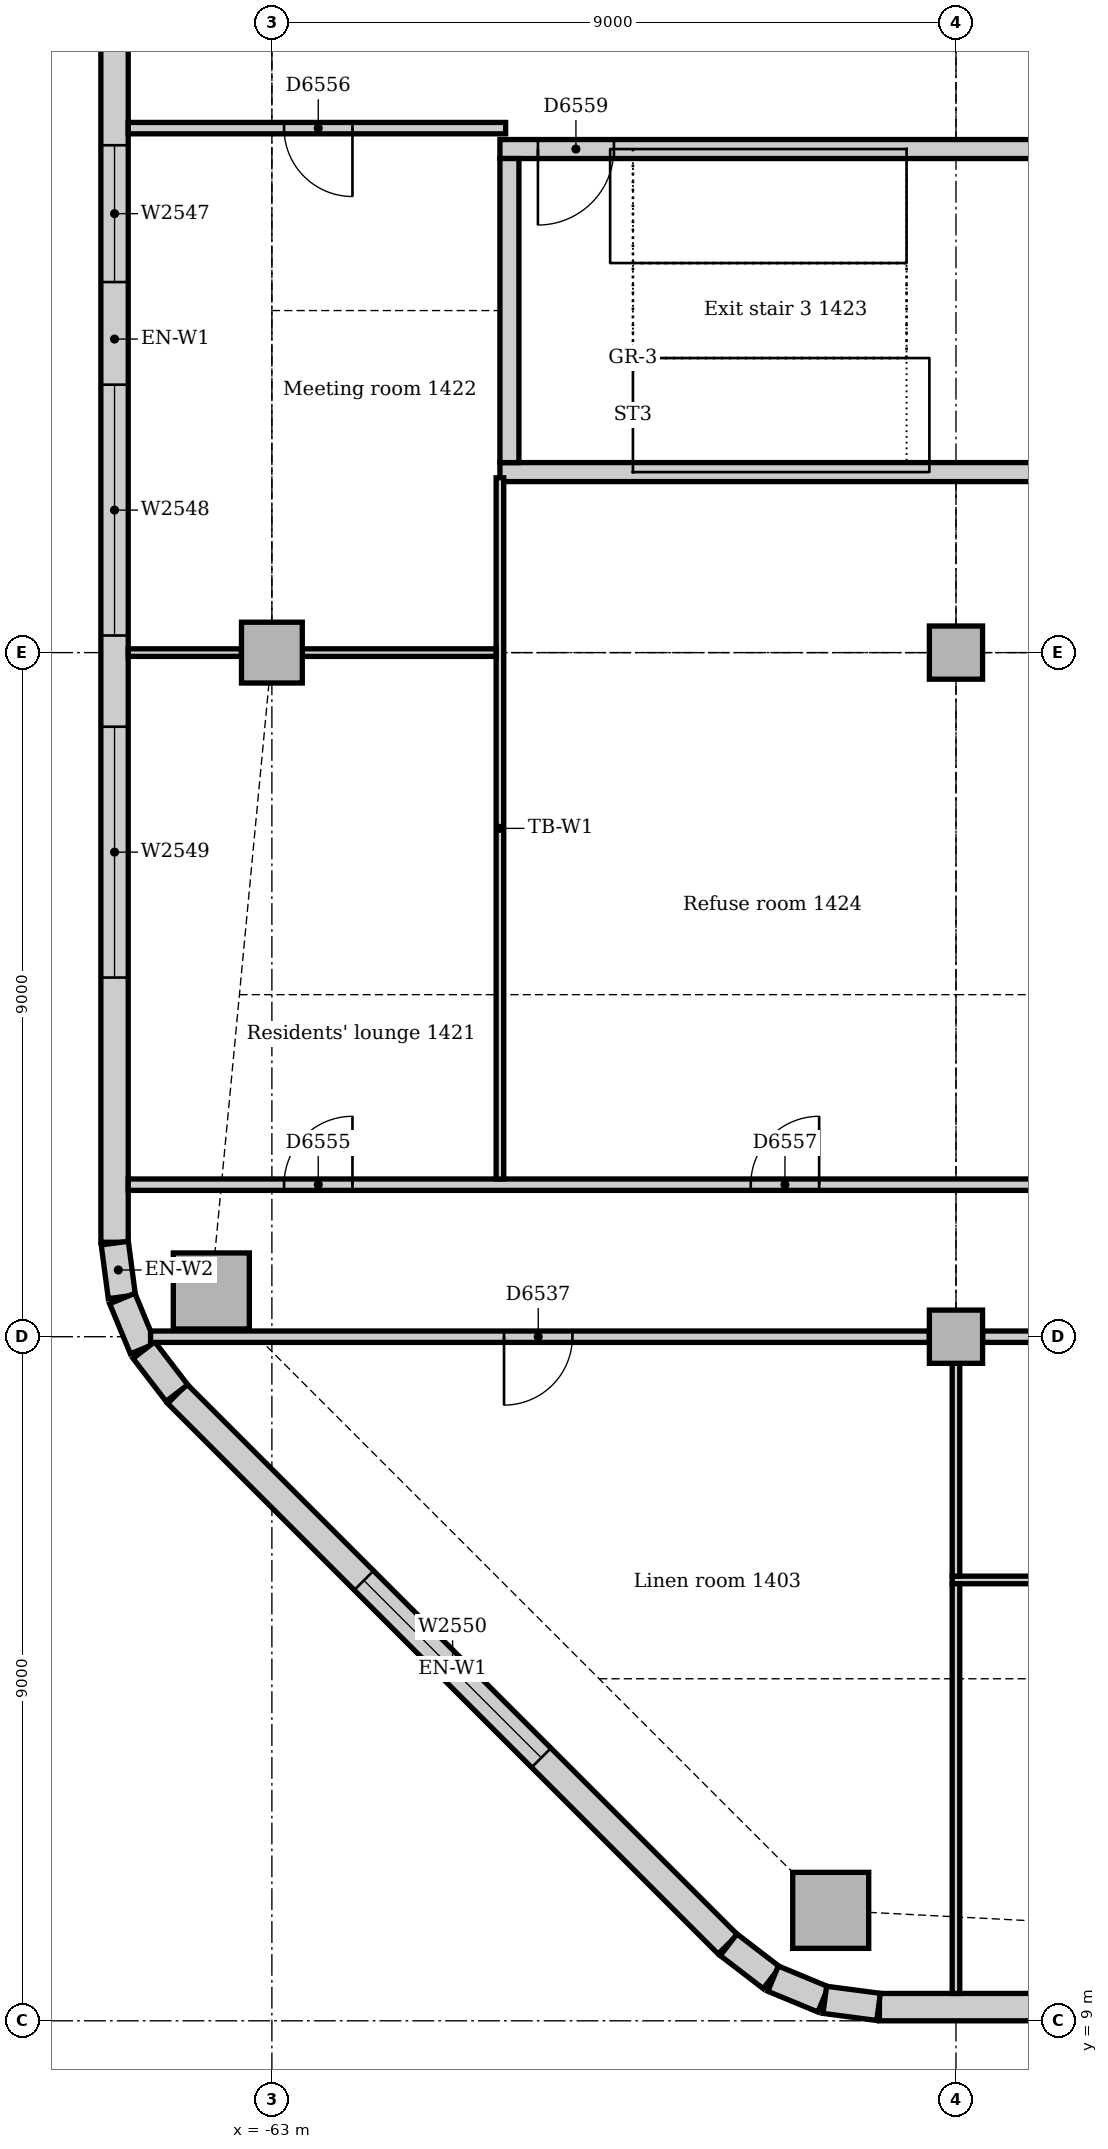
"""IFC4 building model, lengths in metres.
Left out: names, types, materials, properties, quantities, classifications, styles, units other than length and angle.
Written with IfcOpenShell. Run it as: python <this file> out.ifc"""

import sys

from ifc_helpers import new_model, si_unit, direction, frame, frame_2d, origin, origin_2d, place, context, subcontext, project, spatial, rectangle, extrude, element, fill, save


model = new_model("IFC4")
c1 = context("Model", 3, precision=1e-05, world=origin(), true_north=direction((0.0, 1.0)))
c2 = subcontext(c1, "Body", "Model", "MODEL_VIEW")
j1 = project(units=[si_unit("LENGTHUNIT", "METRE"), si_unit("PLANEANGLEUNIT", "RADIAN")], contexts=[c1])
p1 = place(None, origin())
s1 = spatial("IfcSite", under=j1, at=p1, CompositionType="ELEMENT")
p2 = place(p1, origin())
s2 = spatial("IfcBuilding", under=s1, at=p2, CompositionType="ELEMENT")
p3 = place(p2, frame((0.0, 0.0, 63.0)))
s3 = spatial("IfcBuildingStorey", under=s2, at=p3, CompositionType="ELEMENT", Elevation=63.0)
p4 = place(p3, frame((-60.0, 29.375, 0.0), z_axis=(0.0, 0.0, 1.0), x_axis=(1.0, 0.0, 0.0)))
e1 = element("IfcWall", 1, at=p4, inside=s3, PredefinedType="SOLIDWALL", context=c2, shape_type="SweptSolid", body=[
    extrude(rectangle(XDim=7.5, YDim=0.25, at=frame_2d((3.75, 0.0))), origin(), (0.0, 0.0, 1.0), 4.0),
])
p5 = place(p3, frame((-52.5, 33.625, 0.0), z_axis=(0.0, 0.0, 1.0), x_axis=(-1.0, 0.0, 0.0)))
e2 = element("IfcWall", 2, at=p5, inside=s3, PredefinedType="SOLIDWALL", context=c2, shape_type="SweptSolid", body=[
    extrude(rectangle(XDim=7.5, YDim=0.25, at=frame_2d((3.75, 0.0))), origin(), (0.0, 0.0, 1.0), 4.0),
])
p6 = place(p5, frame((6.0, 0.0, 0.0)))
e3 = element("IfcOpeningElement", 3, at=p6, cuts=e2, PredefinedType="OPENING", context=c2, shape_type="SweptSolid", body=[
    extrude(rectangle(XDim=1.0, YDim=2.1, at=frame_2d((0.5, 1.05))), frame((0.0, 0.135, 0.0), z_axis=(0.0, -1.0, 0.0), x_axis=(1.0, 0.0, 0.0)), (0.0, 0.0, 1.0), 0.27),
])
p7 = place(p3, frame((-59.875, 33.5, 0.0), z_axis=(0.0, 0.0, 1.0), x_axis=(0.0, -1.0, 0.0)))
e4 = element("IfcWall", 4, at=p7, inside=s3, PredefinedType="SOLIDWALL", context=c2, shape_type="SweptSolid", body=[
    extrude(rectangle(XDim=4.0, YDim=0.25, at=frame_2d((2.0, 0.0))), origin(), (0.0, 0.0, 1.0), 4.0),
])
for number, where, z_axis, x_axis in (
    (5, (-55.648, 10.453, 0.0), (0.0, 0.0, 1.0), (1.0, 0.0, 0.0)),
    (6, (-63.797, 18.602, 0.0), (0.0, 0.0, 1.0), (1.0, 0.0, 0.0)),
):
    element("IfcColumn", number, at=place(p3, frame(where, z_axis=z_axis, x_axis=x_axis)), inside=s3, PredefinedType="COLUMN", context=c2, shape_type="SweptSolid", body=[
        extrude(rectangle(XDim=1.0, YDim=1.0, at=origin_2d()), origin(), (0.0, 0.0, 1.0), 3.85),
    ])
p8 = place(p3, frame((-63.0, 27.0, 0.0), z_axis=(0.0, 0.0, 1.0), x_axis=(1.0, 0.0, 0.0)))
e7 = element("IfcColumn", 7, at=p8, inside=s3, PredefinedType="COLUMN", context=c2, shape_type="SweptSolid", body=[
    extrude(rectangle(XDim=0.8, YDim=0.8, at=origin_2d()), origin(), (0.0, 0.0, 1.0), 3.85),
])
for number, where, z_axis, x_axis in (
    (8, (-54.0, 18.0, 0.0), (0.0, 0.0, 1.0), (1.0, 0.0, 0.0)),
    (9, (-54.0, 27.0, 0.0), (0.0, 0.0, 1.0), (1.0, 0.0, 0.0)),
):
    element("IfcColumn", number, at=place(p3, frame(where, z_axis=z_axis, x_axis=x_axis)), inside=s3, PredefinedType="COLUMN", context=c2, shape_type="SweptSolid", body=[
        extrude(rectangle(XDim=0.7, YDim=0.7, at=origin_2d()), origin(), (0.0, 0.0, 1.0), 3.85),
    ])
p9 = place(p3, frame((-55.007, 9.18, 0.0), z_axis=(0.0, 0.0, 1.0), x_axis=(1.0, 0.0, 0.0)))
e10 = element("IfcWall", 10, at=p9, inside=s3, PredefinedType="STANDARD", context=c2, shape_type="SweptSolid", body=[
    extrude(rectangle(XDim=23.765, YDim=0.36, at=frame_2d((11.882, 0.0))), origin(), (0.0, 0.0, 1.0), 3.85),
])
p10 = place(p9, frame((3.482, 0.0, 0.9)))
e11 = element("IfcOpeningElement", 11, at=p10, cuts=e10, PredefinedType="OPENING", context=c2, shape_type="SweptSolid", body=[
    extrude(rectangle(XDim=3.3, YDim=1.6, at=frame_2d((1.65, 0.8))), frame((0.0, 0.19, 0.0), z_axis=(0.0, -1.0, 0.0), x_axis=(1.0, 0.0, 0.0)), (0.0, 0.0, 1.0), 0.38),
])
p11 = place(p9, frame((7.982, 0.0, 0.9)))
e12 = element("IfcOpeningElement", 12, at=p11, cuts=e10, PredefinedType="OPENING", context=c2, shape_type="SweptSolid", body=[
    extrude(rectangle(XDim=3.3, YDim=1.6, at=frame_2d((1.65, 0.8))), frame((0.0, 0.19, 0.0), z_axis=(0.0, -1.0, 0.0), x_axis=(1.0, 0.0, 0.0)), (0.0, 0.0, 1.0), 0.38),
])
p12 = place(p9, frame((12.482, 0.0, 0.9)))
e13 = element("IfcOpeningElement", 13, at=p12, cuts=e10, PredefinedType="OPENING", context=c2, shape_type="SweptSolid", body=[
    extrude(rectangle(XDim=3.3, YDim=1.6, at=frame_2d((1.65, 0.8))), frame((0.0, 0.19, 0.0), z_axis=(0.0, -1.0, 0.0), x_axis=(1.0, 0.0, 0.0)), (0.0, 0.0, 1.0), 0.38),
])
p13 = place(p9, frame((16.982, 0.0, 0.9)))
e14 = element("IfcOpeningElement", 14, at=p13, cuts=e10, PredefinedType="OPENING", context=c2, shape_type="SweptSolid", body=[
    extrude(rectangle(XDim=3.3, YDim=1.6, at=frame_2d((1.65, 0.8))), frame((0.0, 0.19, 0.0), z_axis=(0.0, -1.0, 0.0), x_axis=(1.0, 0.0, 0.0)), (0.0, 0.0, 1.0), 0.38),
])
p14 = place(p9, frame((21.424, 0.0, 0.9)))
e15 = element("IfcOpeningElement", 15, at=p14, cuts=e10, PredefinedType="OPENING", context=c2, shape_type="SweptSolid", body=[
    extrude(rectangle(XDim=1.8, YDim=1.6, at=frame_2d((0.9, 0.8))), frame((0.0, 0.19, 0.0), z_axis=(0.0, -1.0, 0.0), x_axis=(1.0, 0.0, 0.0)), (0.0, 0.0, 1.0), 0.38),
])
p15 = place(p3, frame((-65.07, 43.007, 0.0), z_axis=(0.0, 0.0, 1.0), x_axis=(0.0, -1.0, 0.0)))
e16 = element("IfcWall", 16, at=p15, inside=s3, PredefinedType="STANDARD", context=c2, shape_type="SweptSolid", body=[
    extrude(rectangle(XDim=23.765, YDim=0.36, at=frame_2d((11.882, 0.0))), origin(), (0.0, 0.0, 1.0), 3.85),
])
p16 = place(p15, frame((4.232, 0.0, 0.9)))
e17 = element("IfcOpeningElement", 17, at=p16, cuts=e16, PredefinedType="OPENING", context=c2, shape_type="SweptSolid", body=[
    extrude(rectangle(XDim=1.8, YDim=1.6, at=frame_2d((0.9, 0.8))), frame((0.0, 0.19, 0.0), z_axis=(0.0, -1.0, 0.0), x_axis=(1.0, 0.0, 0.0)), (0.0, 0.0, 1.0), 0.38),
])
p17 = place(p15, frame((9.332, 0.0, 0.9)))
e18 = element("IfcOpeningElement", 18, at=p17, cuts=e16, PredefinedType="OPENING", context=c2, shape_type="SweptSolid", body=[
    extrude(rectangle(XDim=1.8, YDim=1.6, at=frame_2d((0.9, 0.8))), frame((0.0, 0.19, 0.0), z_axis=(0.0, -1.0, 0.0), x_axis=(1.0, 0.0, 0.0)), (0.0, 0.0, 1.0), 0.38),
])
p18 = place(p15, frame((12.482, 0.0, 0.9)))
e19 = element("IfcOpeningElement", 19, at=p18, cuts=e16, PredefinedType="OPENING", context=c2, shape_type="SweptSolid", body=[
    extrude(rectangle(XDim=3.3, YDim=1.6, at=frame_2d((1.65, 0.8))), frame((0.0, 0.19, 0.0), z_axis=(0.0, -1.0, 0.0), x_axis=(1.0, 0.0, 0.0)), (0.0, 0.0, 1.0), 0.38),
])
p19 = place(p15, frame((16.982, 0.0, 0.9)))
e20 = element("IfcOpeningElement", 20, at=p19, cuts=e16, PredefinedType="OPENING", context=c2, shape_type="SweptSolid", body=[
    extrude(rectangle(XDim=3.3, YDim=1.6, at=frame_2d((1.65, 0.8))), frame((0.0, 0.19, 0.0), z_axis=(0.0, -1.0, 0.0), x_axis=(1.0, 0.0, 0.0)), (0.0, 0.0, 1.0), 0.38),
])
p20 = place(p3, frame((-64.244, 17.249, 0.0), z_axis=(0.0, 0.0, 1.0), x_axis=(0.707106781187, -0.707106781187, 0.0)))
e21 = element("IfcWall", 21, at=p20, inside=s3, PredefinedType="STANDARD", context=c2, shape_type="SweptSolid", body=[
    extrude(rectangle(XDim=10.243, YDim=0.36, at=frame_2d((5.121, 0.0))), origin(), (0.0, 0.0, 1.0), 3.85),
])
p21 = place(p20, frame((3.471, 0.0, 0.9)))
e22 = element("IfcOpeningElement", 22, at=p21, cuts=e21, PredefinedType="OPENING", context=c2, shape_type="SweptSolid", body=[
    extrude(rectangle(XDim=3.3, YDim=1.6, at=frame_2d((1.65, 0.8))), frame((0.0, 0.19, 0.0), z_axis=(0.0, -1.0, 0.0), x_axis=(1.0, 0.0, 0.0)), (0.0, 0.0, 1.0), 0.38),
])
for number, where, z_axis, x_axis in (
    (23, (-65.067, 19.231, 0.0), (0.0, 0.0, 1.0), (0.131, -0.991, 0.0)),
    (24, (-64.968, 18.503, 0.0), (0.0, 0.0, 1.0), (0.383, -0.924, 0.0)),
):
    element("IfcWall", number, at=place(p3, frame(where, z_axis=z_axis, x_axis=x_axis)), inside=s3, PredefinedType="STANDARD", context=c2, shape_type="SweptSolid", body=[
        extrude(rectangle(XDim=0.713, YDim=0.36, at=frame_2d((0.356, 0.0))), origin(), (0.0, 0.0, 1.0), 3.85),
    ])
for number, where, z_axis, x_axis in (
    (25, (-64.684, 17.825, 0.0), (0.0, 0.0, 1.0), (0.609, -0.793, 0.0)),
    (26, (-56.991, 10.0, 0.0), (0.0, 0.0, 1.0), (0.793, -0.609, 0.0)),
):
    element("IfcWall", number, at=place(p3, frame(where, z_axis=z_axis, x_axis=x_axis)), inside=s3, PredefinedType="STANDARD", context=c2, shape_type="SweptSolid", body=[
        extrude(rectangle(XDim=0.713, YDim=0.36, at=frame_2d((0.357, 0.0))), origin(), (0.0, 0.0, 1.0), 3.85),
    ])
for number, where, z_axis, x_axis in (
    (27, (-56.406, 9.555, 0.0), (0.0, 0.0, 1.0), (0.924, -0.383, 0.0)),
    (28, (-55.726, 9.276, 0.0), (0.0, 0.0, 1.0), (0.991, -0.131, 0.0)),
):
    element("IfcWall", number, at=place(p3, frame(where, z_axis=z_axis, x_axis=x_axis)), inside=s3, PredefinedType="STANDARD", context=c2, shape_type="SweptSolid", body=[
        extrude(rectangle(XDim=0.713, YDim=0.36, at=frame_2d((0.356, 0.0))), origin(), (0.0, 0.0, 1.0), 3.85),
    ])
p22 = place(p3, frame((-53.65, 18.0, 0.0), z_axis=(0.0, 0.0, 1.0), x_axis=(1.0, 0.0, 0.0)))
e29 = element("IfcWall", 29, at=p22, inside=s3, PredefinedType="PARTITIONING", context=c2, shape_type="SweptSolid", body=[
    extrude(rectangle(XDim=8.3, YDim=0.15, at=frame_2d((4.15, 0.0))), origin(), (0.0, 0.0, 1.0), 3.158),
])
p23 = place(p22, frame((6.18, 0.0, 0.0)))
e30 = element("IfcOpeningElement", 30, at=p23, cuts=e29, PredefinedType="OPENING", context=c2, shape_type="SweptSolid", body=[
    extrude(rectangle(XDim=1.0, YDim=2.1, at=frame_2d((0.5, 1.05))), frame((0.0, 0.085, 0.0), z_axis=(0.0, -1.0, 0.0), x_axis=(1.0, 0.0, 0.0)), (0.0, 0.0, 1.0), 0.17),
])
p24 = place(p3, frame((-64.596, 18.0, 0.0), z_axis=(0.0, 0.0, 1.0), x_axis=(1.0, 0.0, 0.0)))
e31 = element("IfcWall", 31, at=p24, inside=s3, PredefinedType="PARTITIONING", context=c2, shape_type="SweptSolid", body=[
    extrude(rectangle(XDim=10.246, YDim=0.15, at=frame_2d((5.123, 0.0))), origin(), (0.0, 0.0, 1.0), 3.158),
])
p25 = place(p24, frame((4.65, 0.0, 0.0)))
e32 = element("IfcOpeningElement", 32, at=p25, cuts=e31, PredefinedType="OPENING", context=c2, shape_type="SweptSolid", body=[
    extrude(rectangle(XDim=0.9, YDim=2.1, at=frame_2d((0.45, 1.05))), frame((0.0, 0.085, 0.0), z_axis=(0.0, -1.0, 0.0), x_axis=(1.0, 0.0, 0.0)), (0.0, 0.0, 1.0), 0.17),
])
p26 = place(p3, frame((-64.89, 20.0, 0.0), z_axis=(0.0, 0.0, 1.0), x_axis=(1.0, 0.0, 0.0)))
e33 = element("IfcWall", 33, at=p26, inside=s3, PredefinedType="PARTITIONING", context=c2, shape_type="SweptSolid", body=[
    extrude(rectangle(XDim=19.965, YDim=0.15, at=frame_2d((9.982, 0.0))), origin(), (0.0, 0.0, 1.0), 3.85),
])
p27 = place(p26, frame((2.05, 0.0, 0.0)))
e34 = element("IfcOpeningElement", 34, at=p27, cuts=e33, PredefinedType="OPENING", context=c2, shape_type="SweptSolid", body=[
    extrude(rectangle(XDim=0.9, YDim=2.1, at=frame_2d((0.45, 1.05))), frame((0.0, 0.085, 0.0), z_axis=(0.0, -1.0, 0.0), x_axis=(1.0, 0.0, 0.0)), (0.0, 0.0, 1.0), 0.17),
])
p28 = place(p26, frame((8.19, 0.0, 0.0)))
e35 = element("IfcOpeningElement", 35, at=p28, cuts=e33, PredefinedType="OPENING", context=c2, shape_type="SweptSolid", body=[
    extrude(rectangle(XDim=0.9, YDim=2.1, at=frame_2d((0.45, 1.05))), frame((0.0, 0.085, 0.0), z_axis=(0.0, -1.0, 0.0), x_axis=(1.0, 0.0, 0.0)), (0.0, 0.0, 1.0), 0.17),
])
p29 = place(p3, frame((-64.89, 33.9, 0.0), z_axis=(0.0, 0.0, 1.0), x_axis=(1.0, 0.0, 0.0)))
e36 = element("IfcWall", 36, at=p29, inside=s3, PredefinedType="PARTITIONING", context=c2, shape_type="SweptSolid", body=[
    extrude(rectangle(XDim=4.965, YDim=0.15, at=frame_2d((2.482, 0.0))), origin(), (0.0, 0.0, 1.0), 3.85),
])
p30 = place(p29, frame((2.05, 0.0, 0.0)))
e37 = element("IfcOpeningElement", 37, at=p30, cuts=e36, PredefinedType="OPENING", context=c2, shape_type="SweptSolid", body=[
    extrude(rectangle(XDim=0.9, YDim=2.1, at=frame_2d((0.45, 1.05))), frame((0.0, 0.085, 0.0), z_axis=(0.0, -1.0, 0.0), x_axis=(1.0, 0.0, 0.0)), (0.0, 0.0, 1.0), 0.17),
])
p31 = place(p3, frame((-54.05, 14.8, 0.0), z_axis=(0.0, 0.0, 1.0), x_axis=(1.0, 0.0, 0.0)))
e38 = element("IfcWall", 38, at=p31, inside=s3, PredefinedType="PARTITIONING", context=c2, shape_type="SweptSolid", body=[
    extrude(rectangle(XDim=17.975, YDim=0.1, at=frame_2d((8.988, 0.0))), origin(), (0.0, 0.0, 1.0), 3.85),
])
p32 = place(p31, frame((7.18, 0.0, 0.0)))
e39 = element("IfcOpeningElement", 39, at=p32, cuts=e38, PredefinedType="OPENING", context=c2, shape_type="SweptSolid", body=[
    extrude(rectangle(XDim=0.9, YDim=2.1, at=frame_2d((0.45, 1.05))), frame((0.0, 0.06, 0.0), z_axis=(0.0, -1.0, 0.0), x_axis=(1.0, 0.0, 0.0)), (0.0, 0.0, 1.0), 0.12),
])
p33 = place(p3, frame((-60.0, 20.075, 0.0), z_axis=(0.0, 0.0, 1.0), x_axis=(0.0, 1.0, 0.0)))
e40 = element("IfcWall", 40, at=p33, inside=s3, PredefinedType="PARTITIONING", context=c2, shape_type="SweptSolid", body=[
    extrude(rectangle(XDim=9.225, YDim=0.1, at=frame_2d((4.612, 0.0))), origin(), (0.0, 0.0, 1.0), 3.85),
])
p34 = place(p3, frame((-54.0, 9.36, 0.0), z_axis=(0.0, 0.0, 1.0), x_axis=(0.0, 1.0, 0.0)))
e41 = element("IfcWall", 41, at=p34, inside=s3, PredefinedType="PARTITIONING", context=c2, shape_type="SweptSolid", body=[
    extrude(rectangle(XDim=5.39, YDim=0.1, at=frame_2d((2.695, 0.0))), origin(), (0.0, 0.0, 1.0), 3.256),
])
p35 = place(p3, frame((-54.0, 14.85, 0.0), z_axis=(0.0, 0.0, 1.0), x_axis=(0.0, 1.0, 0.0)))
e42 = element("IfcWall", 42, at=p35, inside=s3, PredefinedType="PARTITIONING", context=c2, shape_type="SweptSolid", body=[
    extrude(rectangle(XDim=2.8, YDim=0.1, at=frame_2d((1.4, 0.0))), origin(), (0.0, 0.0, 1.0), 3.256),
])
p36 = place(p3, frame((-62.6, 27.0, 0.0), z_axis=(0.0, 0.0, 1.0), x_axis=(1.0, 0.0, 0.0)))
e43 = element("IfcWall", 43, at=p36, inside=s3, PredefinedType="PARTITIONING", context=c2, shape_type="SweptSolid", body=[
    extrude(rectangle(XDim=2.55, YDim=0.1, at=frame_2d((1.275, 0.0))), origin(), (0.0, 0.0, 1.0), 3.158),
])
p37 = place(p3, frame((-64.89, 27.0, 0.0), z_axis=(0.0, 0.0, 1.0), x_axis=(1.0, 0.0, 0.0)))
e44 = element("IfcWall", 44, at=p37, inside=s3, PredefinedType="PARTITIONING", context=c2, shape_type="SweptSolid", body=[
    extrude(rectangle(XDim=1.49, YDim=0.1, at=frame_2d((0.745, 0.0))), origin(), (0.0, 0.0, 1.0), 3.85),
])
p38 = place(p17, origin())
e45 = element("IfcWindow", 45, at=p38, inside=s3, PartitioningType="SINGLE_PANEL", PredefinedType="WINDOW", context=c2, shape_type="SweptSolid", body=[
    extrude(rectangle(XDim=1.8, YDim=1.6, at=frame_2d((0.9, 0.8))), frame((0.0, 0.13, 0.0), z_axis=(0.0, -1.0, 0.0), x_axis=(1.0, 0.0, 0.0)), (0.0, 0.0, 1.0), 0.06),
])
fill(e18, e45)
p39 = place(p18, origin())
e46 = element("IfcWindow", 46, at=p39, inside=s3, PartitioningType="SINGLE_PANEL", PredefinedType="WINDOW", context=c2, shape_type="SweptSolid", body=[
    extrude(rectangle(XDim=3.3, YDim=1.6, at=frame_2d((1.65, 0.8))), frame((0.0, 0.13, 0.0), z_axis=(0.0, -1.0, 0.0), x_axis=(1.0, 0.0, 0.0)), (0.0, 0.0, 1.0), 0.06),
])
fill(e19, e46)
p40 = place(p19, origin())
e47 = element("IfcWindow", 47, at=p40, inside=s3, PartitioningType="SINGLE_PANEL", PredefinedType="WINDOW", context=c2, shape_type="SweptSolid", body=[
    extrude(rectangle(XDim=3.3, YDim=1.6, at=frame_2d((1.65, 0.8))), frame((0.0, 0.13, 0.0), z_axis=(0.0, -1.0, 0.0), x_axis=(1.0, 0.0, 0.0)), (0.0, 0.0, 1.0), 0.06),
])
fill(e20, e47)
p41 = place(p21, origin())
e48 = element("IfcWindow", 48, at=p41, inside=s3, PartitioningType="SINGLE_PANEL", PredefinedType="WINDOW", context=c2, shape_type="SweptSolid", body=[
    extrude(rectangle(XDim=3.3, YDim=1.6, at=frame_2d((1.65, 0.8))), frame((0.0, 0.13, 0.0), z_axis=(0.0, -1.0, 0.0), x_axis=(1.0, 0.0, 0.0)), (0.0, 0.0, 1.0), 0.06),
])
fill(e22, e48)
p42 = place(p25, frame((0.9, 0.0, 0.0), z_axis=(0.0, 0.0, 1.0), x_axis=(-1.0, 0.0, 0.0)))
e49 = element("IfcDoor", 49, at=p42, inside=s3, OperationType="SINGLE_SWING_RIGHT", PredefinedType="DOOR", context=c2, shape_type="SweptSolid", body=[
    extrude(rectangle(XDim=0.9, YDim=2.1, at=frame_2d((0.45, 1.05))), frame((0.0, 0.025, 0.0), z_axis=(0.0, -1.0, 0.0), x_axis=(1.0, 0.0, 0.0)), (0.0, 0.0, 1.0), 0.05),
])
fill(e32, e49)
p43 = place(p27, origin())
e50 = element("IfcDoor", 50, at=p43, inside=s3, OperationType="SINGLE_SWING_RIGHT", PredefinedType="DOOR", context=c2, shape_type="SweptSolid", body=[
    extrude(rectangle(XDim=0.9, YDim=2.1, at=frame_2d((0.45, 1.05))), frame((0.0, 0.025, 0.0), z_axis=(0.0, -1.0, 0.0), x_axis=(1.0, 0.0, 0.0)), (0.0, 0.0, 1.0), 0.05),
])
fill(e34, e50)
p44 = place(p30, frame((0.9, 0.0, 0.0), z_axis=(0.0, 0.0, 1.0), x_axis=(-1.0, 0.0, 0.0)))
e51 = element("IfcDoor", 51, at=p44, inside=s3, OperationType="SINGLE_SWING_LEFT", PredefinedType="DOOR", context=c2, shape_type="SweptSolid", body=[
    extrude(rectangle(XDim=0.9, YDim=2.1, at=frame_2d((0.45, 1.05))), frame((0.0, 0.025, 0.0), z_axis=(0.0, -1.0, 0.0), x_axis=(1.0, 0.0, 0.0)), (0.0, 0.0, 1.0), 0.05),
])
fill(e37, e51)
p45 = place(p28, origin())
e52 = element("IfcDoor", 52, at=p45, inside=s3, OperationType="SINGLE_SWING_RIGHT", PredefinedType="DOOR", context=c2, shape_type="SweptSolid", body=[
    extrude(rectangle(XDim=0.9, YDim=2.1, at=frame_2d((0.45, 1.05))), frame((0.0, 0.025, 0.0), z_axis=(0.0, -1.0, 0.0), x_axis=(1.0, 0.0, 0.0)), (0.0, 0.0, 1.0), 0.05),
])
fill(e35, e52)
p46 = place(p6, origin())
e53 = element("IfcDoor", 53, at=p46, inside=s3, OperationType="SINGLE_SWING_RIGHT", PredefinedType="DOOR", context=c2, shape_type="SweptSolid", body=[
    extrude(rectangle(XDim=1.0, YDim=2.1, at=frame_2d((0.5, 1.05))), frame((0.0, 0.025, 0.0), z_axis=(0.0, -1.0, 0.0), x_axis=(1.0, 0.0, 0.0)), (0.0, 0.0, 1.0), 0.05),
])
fill(e3, e53)
save(model, sys.argv[1])
